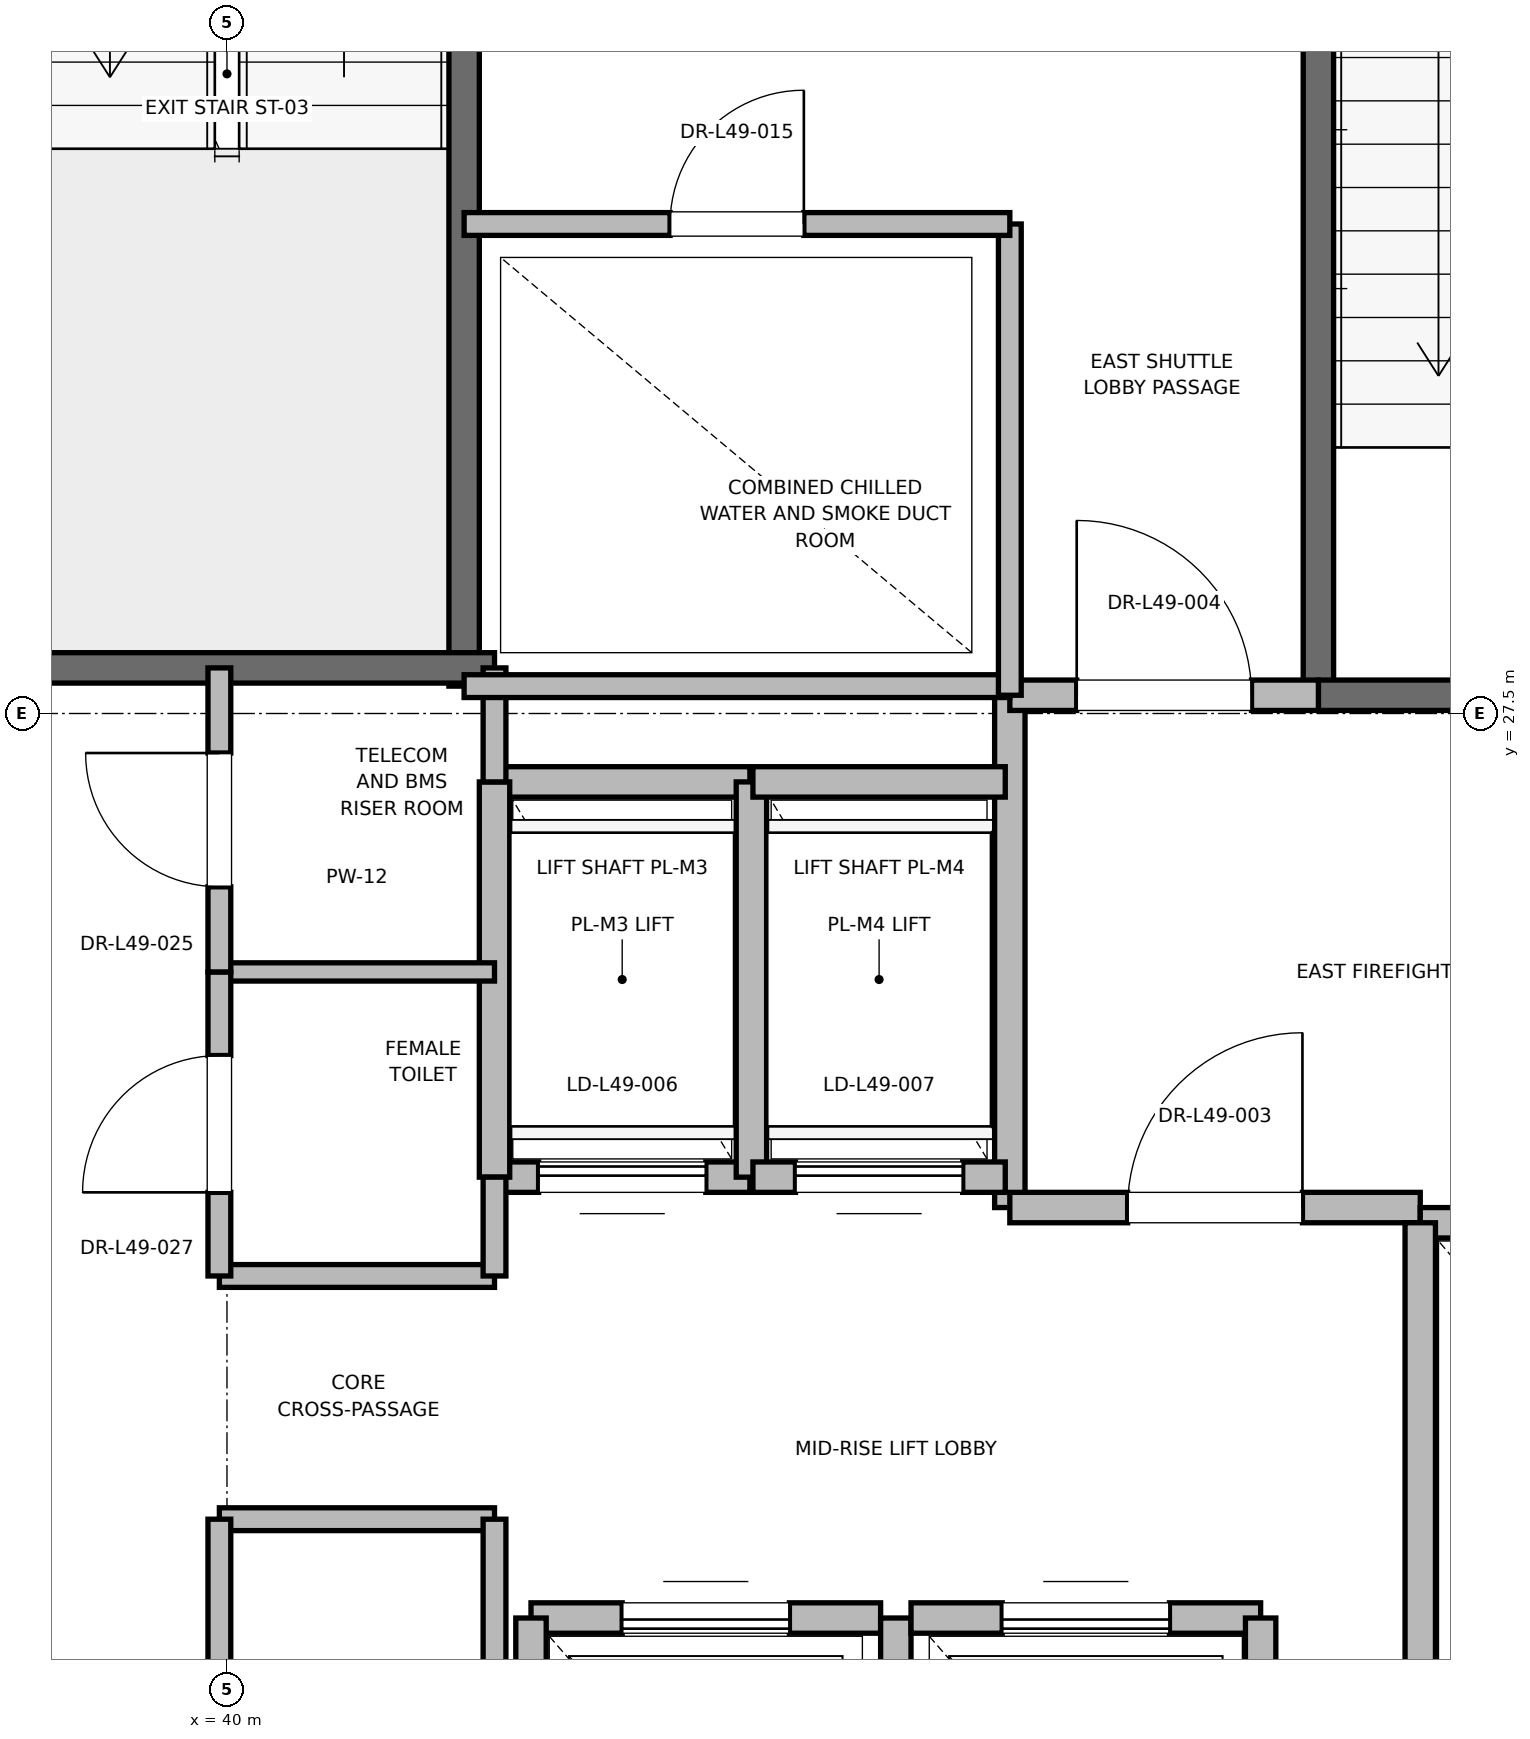
"""IFC4 building model, lengths in metres.
Left out: names, types, materials, properties, quantities, classifications, styles, units other than length and angle.
Written with IfcOpenShell. Run it as: python <this file> out.ifc"""

import sys

from ifc_helpers import new_model, si_unit, direction, frame, frame_2d, origin, place, context, subcontext, project, spatial, rectangle, extrude, element, fill, save


model = new_model("IFC4")
c1 = context("Model", 3, precision=1e-05, world=origin(), true_north=direction((0.0, 1.0)))
c2 = subcontext(c1, "Body", "Model", "MODEL_VIEW")
j1 = project(units=[si_unit("LENGTHUNIT", "METRE"), si_unit("PLANEANGLEUNIT", "RADIAN")], contexts=[c1])
p1 = place(None, origin())
s1 = spatial("IfcSite", under=j1, at=p1, CompositionType="ELEMENT")
p2 = place(p1, origin())
s2 = spatial("IfcBuilding", under=s1, at=p2, CompositionType="ELEMENT")
p3 = place(p2, frame((0.0, 0.0, 213.2)))
s3 = spatial("IfcBuildingStorey", under=s2, at=p3, CompositionType="ELEMENT", Elevation=213.2)
p4 = place(p3, frame((47.18, 27.62, 0.0), z_axis=(0.0, 0.0, 1.0), x_axis=(0.0, 1.0, 0.0)))
e1 = element("IfcWall", 1, at=p4, inside=s3, PredefinedType="SOLIDWALL", context=c2, shape_type="SweptSolid", body=[
    extrude(rectangle(XDim=8.18, YDim=0.2, at=frame_2d((4.09, 0.0))), origin(), (0.0, 0.0, 1.0), 3.775),
])
p5 = place(p3, frame((47.18, 27.62, 0.0), z_axis=(0.0, 0.0, 1.0), x_axis=(1.0, 0.0, 0.0)))
e2 = element("IfcWall", 2, at=p5, inside=s3, PredefinedType="SOLIDWALL", context=c2, shape_type="SweptSolid", body=[
    extrude(rectangle(XDim=3.12, YDim=0.2, at=frame_2d((1.56, 0.0))), origin(), (0.0, 0.0, 1.0), 3.775),
])
p6 = place(p5, frame((1.01, 0.0, 0.0)))
e3 = element("IfcOpeningElement", 3, at=p6, cuts=e2, PredefinedType="OPENING", context=c2, shape_type="SweptSolid", body=[
    extrude(rectangle(XDim=1.1, YDim=2.15, at=frame_2d((0.55, 1.075))), frame((0.0, 0.1, 0.0), z_axis=(0.0, -1.0, 0.0), x_axis=(1.0, 0.0, 0.0)), (0.0, 0.0, 1.0), 0.2),
])
p7 = place(p3, frame((41.56, 27.68, 0.0), z_axis=(0.0, 0.0, 1.0), x_axis=(0.0, 1.0, 0.0)))
e4 = element("IfcWall", 4, at=p7, inside=s3, PredefinedType="SOLIDWALL", context=c2, shape_type="SweptSolid", body=[
    extrude(rectangle(XDim=8.57, YDim=0.2, at=frame_2d((4.285, 0.0))), origin(), (0.0, 0.0, 1.0), 3.775),
])
p8 = place(p3, frame((38.44, 27.8, 0.0), z_axis=(0.0, 0.0, 1.0), x_axis=(1.0, 0.0, 0.0)))
e5 = element("IfcWall", 5, at=p8, inside=s3, PredefinedType="SOLIDWALL", context=c2, shape_type="SweptSolid", body=[
    extrude(rectangle(XDim=3.32, YDim=0.2, at=frame_2d((1.66, 0.0))), origin(), (0.0, 0.0, 1.0), 3.775),
])
p9 = place(p3, frame((45.15, 24.25, 0.0), z_axis=(0.0, 0.0, 1.0), x_axis=(0.0, 1.0, 0.0)))
e6 = element("IfcWall", 6, at=p9, inside=s3, PredefinedType="PARTITIONING", context=c2, shape_type="SweptSolid", body=[
    extrude(rectangle(XDim=3.37, YDim=0.2, at=frame_2d((1.685, 0.0))), origin(), (0.0, 0.0, 1.0), 3.775),
])
p10 = place(p3, frame((45.15, 24.25, 0.0), z_axis=(0.0, 0.0, 1.0), x_axis=(1.0, 0.0, 0.0)))
e7 = element("IfcWall", 7, at=p10, inside=s3, PredefinedType="PARTITIONING", context=c2, shape_type="SweptSolid", body=[
    extrude(rectangle(XDim=2.7, YDim=0.2, at=frame_2d((1.35, 0.0))), origin(), (0.0, 0.0, 1.0), 3.775),
])
p11 = place(p10, frame((0.775, 0.0, 0.0)))
e8 = element("IfcOpeningElement", 8, at=p11, cuts=e7, PredefinedType="OPENING", context=c2, shape_type="SweptSolid", body=[
    extrude(rectangle(XDim=1.15, YDim=2.2, at=frame_2d((0.575, 1.1))), frame((0.0, 0.1, 0.0), z_axis=(0.0, -1.0, 0.0), x_axis=(1.0, 0.0, 0.0)), (0.0, 0.0, 1.0), 0.2),
])
p12 = place(p3, frame((45.15, 27.62, 0.0), z_axis=(0.0, 0.0, 1.0), x_axis=(1.0, 0.0, 0.0)))
e9 = element("IfcWall", 9, at=p12, inside=s3, PredefinedType="PARTITIONING", context=c2, shape_type="SweptSolid", body=[
    extrude(rectangle(XDim=2.03, YDim=0.2, at=frame_2d((1.015, 0.0))), origin(), (0.0, 0.0, 1.0), 3.775),
])
p13 = place(p12, frame((0.44, 0.0, 0.0)))
e10 = element("IfcOpeningElement", 10, at=p13, cuts=e9, PredefinedType="OPENING", context=c2, shape_type="SweptSolid", body=[
    extrude(rectangle(XDim=1.15, YDim=2.2, at=frame_2d((0.575, 1.1))), frame((0.0, 0.1, 0.0), z_axis=(0.0, -1.0, 0.0), x_axis=(1.0, 0.0, 0.0)), (0.0, 0.0, 1.0), 0.2),
])
p14 = place(p3, frame((50.45, 24.15, 0.0), z_axis=(0.0, 0.0, 1.0), x_axis=(-1.0, 0.0, 0.0)))
e11 = element("IfcWall", 11, at=p14, inside=s3, PredefinedType="SOLIDWALL", context=c2, shape_type="SweptSolid", body=[
    extrude(rectangle(XDim=2.6, YDim=0.2, at=frame_2d((1.3, 0.0))), origin(), (0.0, 0.0, 1.0), 2.755),
])
p15 = place(p14, frame((0.75, 0.0, 0.0)))
e12 = element("IfcOpeningElement", 12, at=p15, cuts=e11, PredefinedType="OPENING", context=c2, shape_type="SweptSolid", body=[
    extrude(rectangle(XDim=1.1, YDim=2.2, at=frame_2d((0.55, 1.1))), frame((0.0, 0.1, 0.0), z_axis=(0.0, -1.0, 0.0), x_axis=(1.0, 0.0, 0.0)), (0.0, 0.0, 1.0), 0.2),
])
p16 = place(p3, frame((47.85, 24.15, 0.0), z_axis=(0.0, 0.0, 1.0), x_axis=(0.0, -1.0, 0.0)))
e13 = element("IfcWall", 13, at=p16, inside=s3, PredefinedType="SOLIDWALL", context=c2, shape_type="SweptSolid", body=[
    extrude(rectangle(XDim=3.0, YDim=0.2, at=frame_2d((1.5, 0.0))), origin(), (0.0, 0.0, 1.0), 3.775),
])
p17 = place(p3, frame((44.3, 21.55, 0.0), z_axis=(0.0, 0.0, 1.0), x_axis=(-1.0, 0.0, 0.0)))
e14 = element("IfcWall", 14, at=p17, inside=s3, PredefinedType="SOLIDWALL", context=c2, shape_type="SweptSolid", body=[
    extrude(rectangle(XDim=2.3, YDim=0.2, at=frame_2d((1.15, 0.0))), origin(), (0.0, 0.0, 1.0), 3.775),
])
p18 = place(p17, frame((0.6, 0.0, 0.0)))
e15 = element("IfcOpeningElement", 15, at=p18, cuts=e14, PredefinedType="OPENING", context=c2, shape_type="SweptSolid", body=[
    extrude(rectangle(XDim=1.1, YDim=2.2, at=frame_2d((0.55, 1.1))), frame((0.0, 0.1, 0.0), z_axis=(0.0, -1.0, 0.0), x_axis=(1.0, 0.0, 0.0)), (0.0, 0.0, 1.0), 0.2),
])
p19 = place(p3, frame((42.0, 21.55, 0.0), z_axis=(0.0, 0.0, 1.0), x_axis=(0.0, -1.0, 0.0)))
e16 = element("IfcWall", 16, at=p19, inside=s3, PredefinedType="SOLIDWALL", context=c2, shape_type="SweptSolid", body=[
    extrude(rectangle(XDim=2.6, YDim=0.2, at=frame_2d((1.3, 0.0))), origin(), (0.0, 0.0, 1.0), 2.755),
])
p20 = place(p3, frame((44.4, 18.95, 0.0), z_axis=(0.0, 0.0, 1.0), x_axis=(0.0, 1.0, 0.0)))
e17 = element("IfcWall", 17, at=p20, inside=s3, PredefinedType="SOLIDWALL", context=c2, shape_type="SweptSolid", body=[
    extrude(rectangle(XDim=2.6, YDim=0.2, at=frame_2d((1.3, 0.0))), origin(), (0.0, 0.0, 1.0), 3.775),
])
p21 = place(p3, frame((46.8, 21.55, 0.0), z_axis=(0.0, 0.0, 1.0), x_axis=(-1.0, 0.0, 0.0)))
e18 = element("IfcWall", 18, at=p21, inside=s3, PredefinedType="SOLIDWALL", context=c2, shape_type="SweptSolid", body=[
    extrude(rectangle(XDim=2.3, YDim=0.2, at=frame_2d((1.15, 0.0))), origin(), (0.0, 0.0, 1.0), 3.775),
])
p22 = place(p21, frame((0.6, 0.0, 0.0)))
e19 = element("IfcOpeningElement", 19, at=p22, cuts=e18, PredefinedType="OPENING", context=c2, shape_type="SweptSolid", body=[
    extrude(rectangle(XDim=1.1, YDim=2.2, at=frame_2d((0.55, 1.1))), frame((0.0, 0.1, 0.0), z_axis=(0.0, -1.0, 0.0), x_axis=(1.0, 0.0, 0.0)), (0.0, 0.0, 1.0), 0.2),
])
p23 = place(p3, frame((46.8, 18.95, 0.0), z_axis=(0.0, 0.0, 1.0), x_axis=(0.0, 1.0, 0.0)))
e20 = element("IfcWall", 20, at=p23, inside=s3, PredefinedType="SOLIDWALL", context=c2, shape_type="SweptSolid", body=[
    extrude(rectangle(XDim=2.6, YDim=0.2, at=frame_2d((1.3, 0.0))), origin(), (0.0, 0.0, 1.0), 3.775),
])
p24 = place(p3, frame((41.76, 24.45, 0.0), z_axis=(0.0, 0.0, 1.0), x_axis=(1.0, 0.0, 0.0)))
e21 = element("IfcWall", 21, at=p24, inside=s3, PredefinedType="SOLIDWALL", context=c2, shape_type="SweptSolid", body=[
    extrude(rectangle(XDim=1.68, YDim=0.2, at=frame_2d((0.84, 0.0))), origin(), (0.0, 0.0, 1.0), 3.775),
])
p25 = place(p24, frame((0.29, 0.0, 0.0)))
e22 = element("IfcOpeningElement", 22, at=p25, cuts=e21, PredefinedType="OPENING", context=c2, shape_type="SweptSolid", body=[
    extrude(rectangle(XDim=1.1, YDim=2.2, at=frame_2d((0.55, 1.1))), frame((0.0, 0.1, 0.0), z_axis=(0.0, -1.0, 0.0), x_axis=(1.0, 0.0, 0.0)), (0.0, 0.0, 1.0), 0.2),
])
p26 = place(p3, frame((43.44, 27.05, 0.0), z_axis=(0.0, 0.0, 1.0), x_axis=(-1.0, 0.0, 0.0)))
e23 = element("IfcWall", 23, at=p26, inside=s3, PredefinedType="SOLIDWALL", context=c2, shape_type="SweptSolid", body=[
    extrude(rectangle(XDim=1.68, YDim=0.2, at=frame_2d((0.84, 0.0))), origin(), (0.0, 0.0, 1.0), 3.775),
])
for number, where, z_axis, x_axis in (
    (24, (41.76, 27.05, 0.0), (0.0, 0.0, 1.0), (0.0, -1.0, 0.0)),
    (25, (43.45, 24.45, 0.0), (0.0, 0.0, 1.0), (0.0, 1.0, 0.0)),
):
    element("IfcWall", number, at=place(p3, frame(where, z_axis=z_axis, x_axis=x_axis)), inside=s3, PredefinedType="SOLIDWALL", context=c2, shape_type="SweptSolid", body=[
        extrude(rectangle(XDim=2.6, YDim=0.2, at=frame_2d((1.3, 0.0))), origin(), (0.0, 0.0, 1.0), 3.775),
    ])
p27 = place(p3, frame((43.46, 24.45, 0.0), z_axis=(0.0, 0.0, 1.0), x_axis=(1.0, 0.0, 0.0)))
e26 = element("IfcWall", 26, at=p27, inside=s3, PredefinedType="SOLIDWALL", context=c2, shape_type="SweptSolid", body=[
    extrude(rectangle(XDim=1.66, YDim=0.2, at=frame_2d((0.83, 0.0))), origin(), (0.0, 0.0, 1.0), 3.775),
])
p28 = place(p27, frame((0.28, 0.0, 0.0)))
e27 = element("IfcOpeningElement", 27, at=p28, cuts=e26, PredefinedType="OPENING", context=c2, shape_type="SweptSolid", body=[
    extrude(rectangle(XDim=1.1, YDim=2.2, at=frame_2d((0.55, 1.1))), frame((0.0, 0.1, 0.0), z_axis=(0.0, -1.0, 0.0), x_axis=(1.0, 0.0, 0.0)), (0.0, 0.0, 1.0), 0.2),
])
p29 = place(p3, frame((45.12, 27.05, 0.0), z_axis=(0.0, 0.0, 1.0), x_axis=(-1.0, 0.0, 0.0)))
e28 = element("IfcWall", 28, at=p29, inside=s3, PredefinedType="SOLIDWALL", context=c2, shape_type="SweptSolid", body=[
    extrude(rectangle(XDim=1.66, YDim=0.2, at=frame_2d((0.83, 0.0))), origin(), (0.0, 0.0, 1.0), 3.775),
])
for number, where, z_axis, x_axis in (
    (29, (39.95, 22.2, 0.0), (0.0, 0.0, 1.0), (1.0, 0.0, 0.0)),
    (30, (39.95, 23.8, 0.0), (0.0, 0.0, 1.0), (1.0, 0.0, 0.0)),
):
    element("IfcWall", number, at=place(p3, frame(where, z_axis=z_axis, x_axis=x_axis)), inside=s3, PredefinedType="PARTITIONING", context=c2, shape_type="SweptSolid", body=[
        extrude(rectangle(XDim=1.81, YDim=0.15, at=frame_2d((0.905, 0.0))), origin(), (0.0, 0.0, 1.0), 2.85),
    ])
p30 = place(p3, frame((39.95, 25.8, 0.0), z_axis=(0.0, 0.0, 1.0), x_axis=(1.0, 0.0, 0.0)))
e31 = element("IfcWall", 31, at=p30, inside=s3, PredefinedType="PARTITIONING", context=c2, shape_type="SweptSolid", body=[
    extrude(rectangle(XDim=1.81, YDim=0.12, at=frame_2d((0.905, 0.0))), origin(), (0.0, 0.0, 1.0), 2.85),
])
p31 = place(p3, frame((41.76, 18.6, 0.0), z_axis=(0.0, 0.0, 1.0), x_axis=(0.0, 1.0, 0.0)))
e32 = element("IfcWall", 32, at=p31, inside=s3, PredefinedType="PARTITIONING", context=c2, shape_type="SweptSolid", body=[
    extrude(rectangle(XDim=3.6, YDim=0.15, at=frame_2d((1.8, 0.0))), origin(), (0.0, 0.0, 1.0), 2.755),
])
p32 = place(p3, frame((41.76, 23.8, 0.0), z_axis=(0.0, 0.0, 1.0), x_axis=(0.0, 1.0, 0.0)))
e33 = element("IfcWall", 33, at=p32, inside=s3, PredefinedType="PARTITIONING", context=c2, shape_type="SweptSolid", body=[
    extrude(rectangle(XDim=0.65, YDim=0.15, at=frame_2d((0.325, 0.0))), origin(), (0.0, 0.0, 1.0), 2.85),
])
p33 = place(p3, frame((41.76, 27.05, 0.0), z_axis=(0.0, 0.0, 1.0), x_axis=(0.0, 1.0, 0.0)))
e34 = element("IfcWall", 34, at=p33, inside=s3, PredefinedType="PARTITIONING", context=c2, shape_type="SweptSolid", body=[
    extrude(rectangle(XDim=0.75, YDim=0.15, at=frame_2d((0.375, 0.0))), origin(), (0.0, 0.0, 1.0), 2.85),
])
p34 = place(p3, frame((39.95, 19.2, 0.0), z_axis=(0.0, 0.0, 1.0), x_axis=(0.0, 1.0, 0.0)))
e35 = element("IfcWall", 35, at=p34, inside=s3, PredefinedType="PARTITIONING", context=c2, shape_type="SweptSolid", body=[
    extrude(rectangle(XDim=3.0, YDim=0.15, at=frame_2d((1.5, 0.0))), origin(), (0.0, 0.0, 1.0), 2.85),
])
p35 = place(p34, frame((1.05, 0.0, 0.0)))
e36 = element("IfcOpeningElement", 36, at=p35, cuts=e35, PredefinedType="OPENING", context=c2, shape_type="SweptSolid", body=[
    extrude(rectangle(XDim=0.9, YDim=2.1, at=frame_2d((0.45, 1.05))), frame((0.0, 0.075, 0.0), z_axis=(0.0, -1.0, 0.0), x_axis=(1.0, 0.0, 0.0)), (0.0, 0.0, 1.0), 0.15),
])
p36 = place(p3, frame((39.95, 23.8, 0.0), z_axis=(0.0, 0.0, 1.0), x_axis=(0.0, 1.0, 0.0)))
e37 = element("IfcWall", 37, at=p36, inside=s3, PredefinedType="PARTITIONING", context=c2, shape_type="SweptSolid", body=[
    extrude(rectangle(XDim=2.0, YDim=0.15, at=frame_2d((1.0, 0.0))), origin(), (0.0, 0.0, 1.0), 2.85),
])
p37 = place(p36, frame((0.55, 0.0, 0.0)))
e38 = element("IfcOpeningElement", 38, at=p37, cuts=e37, PredefinedType="OPENING", context=c2, shape_type="SweptSolid", body=[
    extrude(rectangle(XDim=0.9, YDim=2.1, at=frame_2d((0.45, 1.05))), frame((0.0, 0.075, 0.0), z_axis=(0.0, -1.0, 0.0), x_axis=(1.0, 0.0, 0.0)), (0.0, 0.0, 1.0), 0.15),
])
p38 = place(p3, frame((39.95, 25.8, 0.0), z_axis=(0.0, 0.0, 1.0), x_axis=(0.0, 1.0, 0.0)))
e39 = element("IfcWall", 39, at=p38, inside=s3, PredefinedType="PARTITIONING", context=c2, shape_type="SweptSolid", body=[
    extrude(rectangle(XDim=2.0, YDim=0.15, at=frame_2d((1.0, 0.0))), origin(), (0.0, 0.0, 1.0), 2.85),
])
p39 = place(p38, frame((0.56, 0.0, 0.0)))
e40 = element("IfcOpeningElement", 40, at=p39, cuts=e39, PredefinedType="OPENING", context=c2, shape_type="SweptSolid", body=[
    extrude(rectangle(XDim=0.88, YDim=2.1, at=frame_2d((0.44, 1.05))), frame((0.0, 0.075, 0.0), z_axis=(0.0, -1.0, 0.0), x_axis=(1.0, 0.0, 0.0)), (0.0, 0.0, 1.0), 0.15),
])
p40 = place(p3, frame((41.56, 27.68, 0.0), z_axis=(0.0, 0.0, 1.0), x_axis=(1.0, 0.0, 0.0)))
e41 = element("IfcWall", 41, at=p40, inside=s3, PredefinedType="PARTITIONING", context=c2, shape_type="SweptSolid", body=[
    extrude(rectangle(XDim=3.59, YDim=0.15, at=frame_2d((1.795, 0.0))), origin(), (0.0, 0.0, 1.0), 2.85),
])
p41 = place(p3, frame((45.15, 27.62, 0.0), z_axis=(0.0, 0.0, 1.0), x_axis=(0.0, 1.0, 0.0)))
e42 = element("IfcWall", 42, at=p41, inside=s3, PredefinedType="PARTITIONING", context=c2, shape_type="SweptSolid", body=[
    extrude(rectangle(XDim=3.1, YDim=0.15, at=frame_2d((1.55, 0.0))), origin(), (0.0, 0.0, 1.0), 2.85),
])
p42 = place(p3, frame((41.56, 30.72, 0.0), z_axis=(0.0, 0.0, 1.0), x_axis=(1.0, 0.0, 0.0)))
e43 = element("IfcWall", 43, at=p42, inside=s3, PredefinedType="PARTITIONING", context=c2, shape_type="SweptSolid", body=[
    extrude(rectangle(XDim=3.59, YDim=0.15, at=frame_2d((1.795, 0.0))), origin(), (0.0, 0.0, 1.0), 2.85),
])
p43 = place(p42, frame((1.355, 0.0, 0.0)))
e44 = element("IfcOpeningElement", 44, at=p43, cuts=e43, PredefinedType="OPENING", context=c2, shape_type="SweptSolid", body=[
    extrude(rectangle(XDim=0.88, YDim=2.1, at=frame_2d((0.44, 1.05))), frame((0.0, 0.075, 0.0), z_axis=(0.0, -1.0, 0.0), x_axis=(1.0, 0.0, 0.0)), (0.0, 0.0, 1.0), 0.15),
])
p44 = place(p11, origin())
e45 = element("IfcDoor", 45, at=p44, inside=s3, OperationType="SINGLE_SWING_RIGHT", PredefinedType="DOOR", context=c2, shape_type="SweptSolid", body=[
    extrude(rectangle(XDim=1.15, YDim=2.2, at=frame_2d((0.575, 1.1))), frame((0.0, 0.025, 0.0), z_axis=(0.0, -1.0, 0.0), x_axis=(1.0, 0.0, 0.0)), (0.0, 0.0, 1.0), 0.05),
])
fill(e8, e45)
p45 = place(p13, origin())
e46 = element("IfcDoor", 46, at=p45, inside=s3, OperationType="SINGLE_SWING_LEFT", PredefinedType="DOOR", context=c2, shape_type="SweptSolid", body=[
    extrude(rectangle(XDim=1.15, YDim=2.2, at=frame_2d((0.575, 1.1))), frame((0.0, 0.025, 0.0), z_axis=(0.0, -1.0, 0.0), x_axis=(1.0, 0.0, 0.0)), (0.0, 0.0, 1.0), 0.05),
])
fill(e10, e46)
p46 = place(p18, origin())
e47 = element("IfcDoor", 47, at=p46, inside=s3, OperationType="SLIDING_TO_RIGHT", PredefinedType="DOOR", context=c2, shape_type="SweptSolid", body=[
    extrude(rectangle(XDim=1.1, YDim=2.2, at=frame_2d((0.55, 1.1))), frame((0.0, 0.025, 0.0), z_axis=(0.0, -1.0, 0.0), x_axis=(1.0, 0.0, 0.0)), (0.0, 0.0, 1.0), 0.05),
])
fill(e15, e47)
p47 = place(p22, origin())
e48 = element("IfcDoor", 48, at=p47, inside=s3, OperationType="SLIDING_TO_RIGHT", PredefinedType="DOOR", context=c2, shape_type="SweptSolid", body=[
    extrude(rectangle(XDim=1.1, YDim=2.2, at=frame_2d((0.55, 1.1))), frame((0.0, 0.025, 0.0), z_axis=(0.0, -1.0, 0.0), x_axis=(1.0, 0.0, 0.0)), (0.0, 0.0, 1.0), 0.05),
])
fill(e19, e48)
p48 = place(p25, origin())
e49 = element("IfcDoor", 49, at=p48, inside=s3, OperationType="SLIDING_TO_RIGHT", PredefinedType="DOOR", context=c2, shape_type="SweptSolid", body=[
    extrude(rectangle(XDim=1.1, YDim=2.2, at=frame_2d((0.55, 1.1))), frame((0.0, 0.025, 0.0), z_axis=(0.0, -1.0, 0.0), x_axis=(1.0, 0.0, 0.0)), (0.0, 0.0, 1.0), 0.05),
])
fill(e22, e49)
p49 = place(p28, origin())
e50 = element("IfcDoor", 50, at=p49, inside=s3, OperationType="SLIDING_TO_RIGHT", PredefinedType="DOOR", context=c2, shape_type="SweptSolid", body=[
    extrude(rectangle(XDim=1.1, YDim=2.2, at=frame_2d((0.55, 1.1))), frame((0.0, 0.025, 0.0), z_axis=(0.0, -1.0, 0.0), x_axis=(1.0, 0.0, 0.0)), (0.0, 0.0, 1.0), 0.05),
])
fill(e27, e50)
p50 = place(p37, origin())
e51 = element("IfcDoor", 51, at=p50, inside=s3, OperationType="SINGLE_SWING_LEFT", PredefinedType="DOOR", context=c2, shape_type="SweptSolid", body=[
    extrude(rectangle(XDim=0.9, YDim=2.1, at=frame_2d((0.45, 1.05))), frame((0.0, 0.025, 0.0), z_axis=(0.0, -1.0, 0.0), x_axis=(1.0, 0.0, 0.0)), (0.0, 0.0, 1.0), 0.05),
])
fill(e38, e51)
p51 = place(p39, origin())
e52 = element("IfcDoor", 52, at=p51, inside=s3, OperationType="SINGLE_SWING_RIGHT", PredefinedType="DOOR", context=c2, shape_type="SweptSolid", body=[
    extrude(rectangle(XDim=0.88, YDim=2.1, at=frame_2d((0.44, 1.05))), frame((0.0, 0.025, 0.0), z_axis=(0.0, -1.0, 0.0), x_axis=(1.0, 0.0, 0.0)), (0.0, 0.0, 1.0), 0.05),
])
fill(e40, e52)
p52 = place(p43, origin())
e53 = element("IfcDoor", 53, at=p52, inside=s3, OperationType="SINGLE_SWING_RIGHT", PredefinedType="DOOR", context=c2, shape_type="SweptSolid", body=[
    extrude(rectangle(XDim=0.88, YDim=2.1, at=frame_2d((0.44, 1.05))), frame((0.0, 0.025, 0.0), z_axis=(0.0, -1.0, 0.0), x_axis=(1.0, 0.0, 0.0)), (0.0, 0.0, 1.0), 0.05),
])
fill(e44, e53)
save(model, sys.argv[1])
